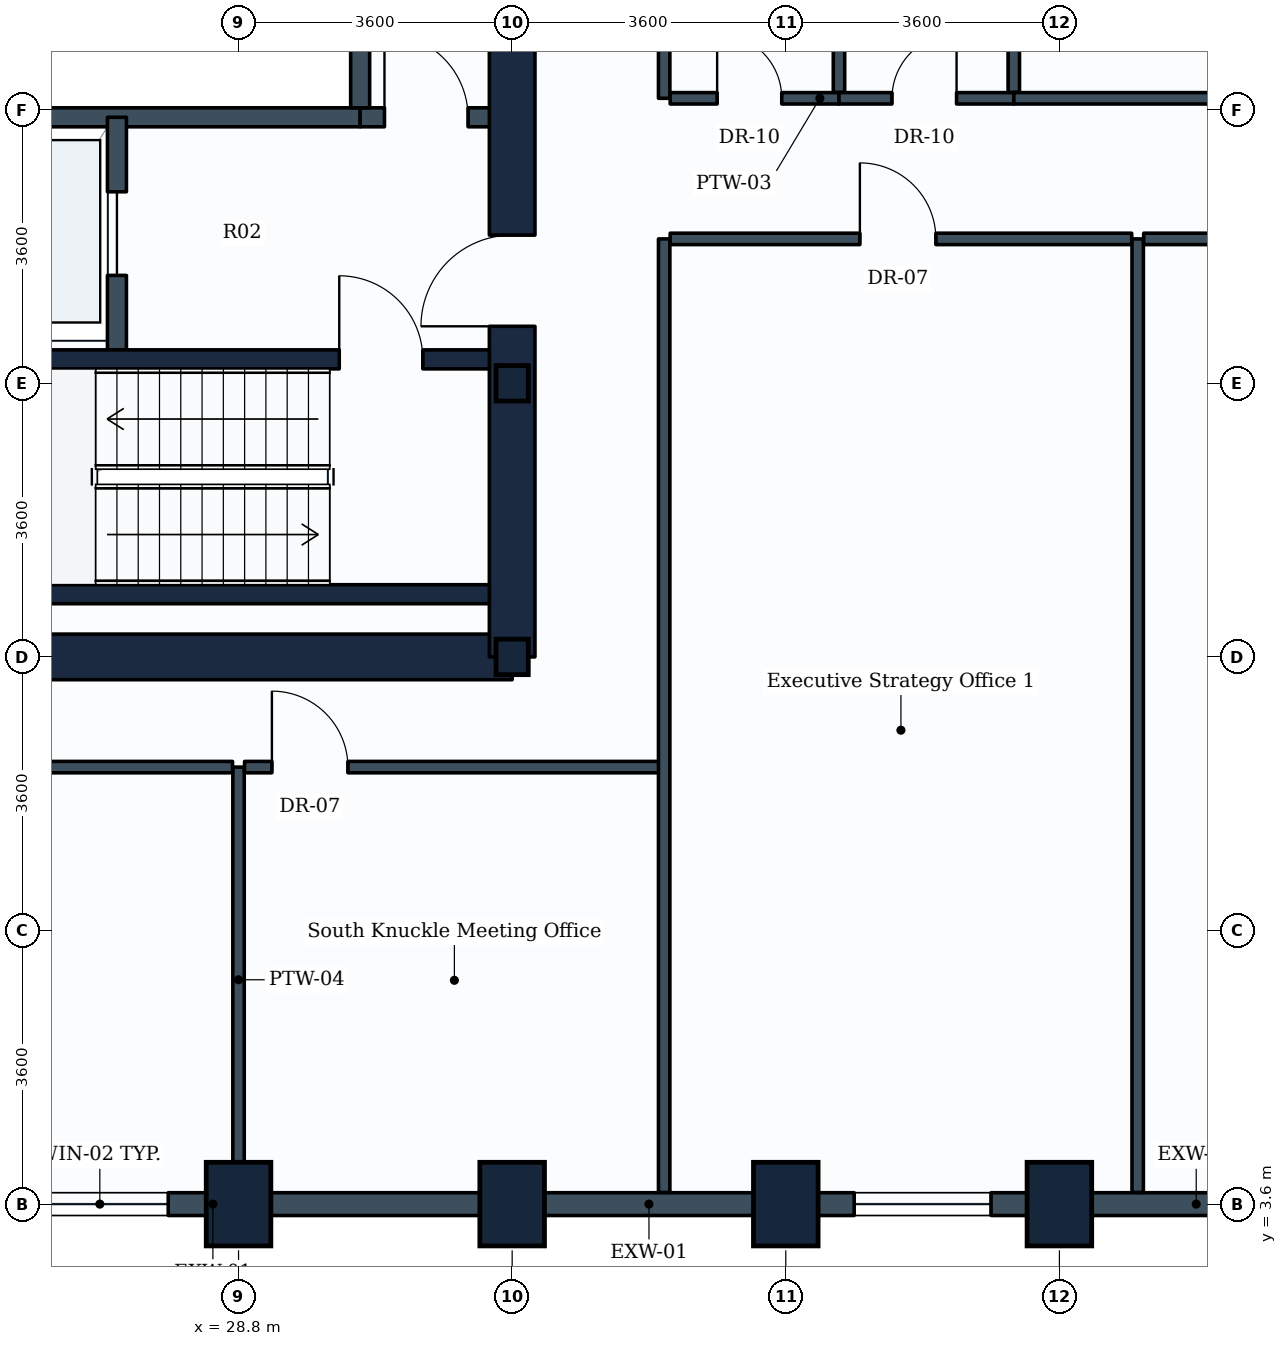
"""IFC4 building model, lengths in metres.
Left out: names, types, materials, properties, quantities, classifications, styles, units other than length and angle.
Written with IfcOpenShell. Run it as: python <this file> out.ifc"""

import sys

from ifc_helpers import new_model, si_unit, direction, frame, frame_2d, origin, origin_2d, place, context, subcontext, project, spatial, rectangle, i_section, extrude, element, fill, save


model = new_model("IFC4")
c1 = context("Model", 3, precision=1e-05, world=origin(), true_north=direction((0.0, 1.0)))
c2 = subcontext(c1, "Body", "Model", "MODEL_VIEW")
j1 = project(units=[si_unit("LENGTHUNIT", "METRE"), si_unit("PLANEANGLEUNIT", "RADIAN")], contexts=[c1])
p1 = place(None, origin())
s1 = spatial("IfcSite", under=j1, at=p1, CompositionType="ELEMENT")
p2 = place(p1, origin())
s2 = spatial("IfcBuilding", under=s1, at=p2, CompositionType="ELEMENT")
p3 = place(p2, frame((0.0, 0.0, 80.1)))
s3 = spatial("IfcBuildingStorey", under=s2, at=p3, CompositionType="ELEMENT", Elevation=80.1)
for number, where, z_axis, x_axis in (
    (1, (28.8, 3.6, 0.0), (0.0, 0.0, 1.0), (1.0, 0.0, 0.0)),
    (2, (32.4, 3.6, 0.0), (0.0, 0.0, 1.0), (1.0, 0.0, 0.0)),
):
    element("IfcColumn", number, at=place(p3, frame(where, z_axis=z_axis, x_axis=x_axis)), inside=s3, PredefinedType="COLUMN", context=c2, shape_type="SweptSolid", body=[
        extrude(rectangle(XDim=0.85, YDim=1.1, at=origin_2d()), origin(), (0.0, 0.0, 1.0), 3.9),
    ])
for number, where, z_axis, x_axis in (
    (3, (32.4, 10.8, 0.0), (0.0, 0.0, 1.0), (1.0, 0.0, 0.0)),
    (4, (32.4, 14.4, 0.0), (0.0, 0.0, 1.0), (1.0, 0.0, 0.0)),
):
    element("IfcColumn", number, at=place(p3, frame(where, z_axis=z_axis, x_axis=x_axis)), inside=s3, PredefinedType="COLUMN", context=c2, shape_type="SweptSolid", body=[
        extrude(i_section(OverallWidth=0.424, OverallDepth=0.467, WebThickness=0.033, FlangeThickness=0.053, FilletRadius=0.015, at=origin_2d()), origin(), (0.0, 0.0, 1.0), 3.9),
    ])
for number, where, z_axis, x_axis in (
    (5, (36.0, 3.6, 0.0), (0.0, 0.0, 1.0), (1.0, 0.0, 0.0)),
    (6, (39.6, 3.6, 0.0), (0.0, 0.0, 1.0), (1.0, 0.0, 0.0)),
):
    element("IfcColumn", number, at=place(p3, frame(where, z_axis=z_axis, x_axis=x_axis)), inside=s3, PredefinedType="COLUMN", context=c2, shape_type="SweptSolid", body=[
        extrude(rectangle(XDim=0.85, YDim=1.1, at=origin_2d()), origin(), (0.0, 0.0, 1.0), 3.9),
    ])
p4 = place(p3, frame((28.8, 3.6, 0.0), z_axis=(0.0, 0.0, 1.0), x_axis=(-1.0, 0.0, 0.0)))
e7 = element("IfcWall", 7, at=p4, inside=s3, PredefinedType="STANDARD", context=c2, shape_type="SweptSolid", body=[
    extrude(rectangle(XDim=3.6, YDim=0.3, at=frame_2d((1.8, 0.0))), origin(), (0.0, 0.0, 1.0), 2.93),
])
p5 = place(p4, frame((0.925, 0.0, 0.85)))
e8 = element("IfcOpeningElement", 8, at=p5, cuts=e7, PredefinedType="OPENING", context=c2, shape_type="SweptSolid", body=[
    extrude(rectangle(XDim=1.8, YDim=1.35, at=frame_2d((0.9, 0.675))), frame((0.0, 0.16, 0.0), z_axis=(0.0, -1.0, 0.0), x_axis=(1.0, 0.0, 0.0)), (0.0, 0.0, 1.0), 0.32),
])
p6 = place(p3, frame((32.4, 3.6, 0.0), z_axis=(0.0, 0.0, 1.0), x_axis=(-1.0, 0.0, 0.0)))
e9 = element("IfcWall", 9, at=p6, inside=s3, PredefinedType="STANDARD", context=c2, shape_type="SweptSolid", body=[
    extrude(rectangle(XDim=3.6, YDim=0.3, at=frame_2d((1.8, 0.0))), origin(), (0.0, 0.0, 1.0), 2.93),
])
p7 = place(p3, frame((36.0, 3.6, 0.0), z_axis=(0.0, 0.0, 1.0), x_axis=(-1.0, 0.0, 0.0)))
e10 = element("IfcWall", 10, at=p7, inside=s3, PredefinedType="STANDARD", context=c2, shape_type="SweptSolid", body=[
    extrude(rectangle(XDim=3.6, YDim=0.3, at=frame_2d((1.8, 0.0))), origin(), (0.0, 0.0, 1.0), 2.93),
])
p8 = place(p3, frame((39.6, 3.6, 0.0), z_axis=(0.0, 0.0, 1.0), x_axis=(-1.0, 0.0, 0.0)))
e11 = element("IfcWall", 11, at=p8, inside=s3, PredefinedType="STANDARD", context=c2, shape_type="SweptSolid", body=[
    extrude(rectangle(XDim=3.6, YDim=0.3, at=frame_2d((1.8, 0.0))), origin(), (0.0, 0.0, 1.0), 2.93),
])
p9 = place(p8, frame((0.9, 0.0, 0.85)))
e12 = element("IfcOpeningElement", 12, at=p9, cuts=e11, PredefinedType="OPENING", context=c2, shape_type="SweptSolid", body=[
    extrude(rectangle(XDim=1.8, YDim=1.35, at=frame_2d((0.9, 0.675))), frame((0.0, 0.16, 0.0), z_axis=(0.0, -1.0, 0.0), x_axis=(1.0, 0.0, 0.0)), (0.0, 0.0, 1.0), 0.32),
])
p10 = place(p3, frame((43.2, 3.6, 0.0), z_axis=(0.0, 0.0, 1.0), x_axis=(-1.0, 0.0, 0.0)))
e13 = element("IfcWall", 13, at=p10, inside=s3, PredefinedType="STANDARD", context=c2, shape_type="SweptSolid", body=[
    extrude(rectangle(XDim=3.6, YDim=0.3, at=frame_2d((1.8, 0.0))), origin(), (0.0, 0.0, 1.0), 2.93),
])
p11 = place(p3, frame((14.4, 10.8, 0.0), z_axis=(0.0, 0.0, 1.0), x_axis=(1.0, 0.0, 0.0)))
e14 = element("IfcWall", 14, at=p11, inside=s3, PredefinedType="SHEAR", context=c2, shape_type="SweptSolid", body=[
    extrude(rectangle(XDim=18.0, YDim=0.6, at=frame_2d((9.0, 0.0))), origin(), (0.0, 0.0, 1.0), 3.65),
])
p12 = place(p3, frame((32.4, 10.8, 0.0), z_axis=(0.0, 0.0, 1.0), x_axis=(0.0, 1.0, 0.0)))
e15 = element("IfcWall", 15, at=p12, inside=s3, PredefinedType="SHEAR", context=c2, shape_type="SweptSolid", body=[
    extrude(rectangle(XDim=14.4, YDim=0.6, at=frame_2d((7.2, 0.0))), origin(), (0.0, 0.0, 1.0), 3.65),
])
p13 = place(p12, frame((4.35, 0.0, 0.0)))
e16 = element("IfcOpeningElement", 16, at=p13, cuts=e15, PredefinedType="OPENING", context=c2, shape_type="SweptSolid", body=[
    extrude(rectangle(XDim=1.2, YDim=2.1, at=frame_2d((0.6, 1.05))), frame((0.0, 0.31, 0.0), z_axis=(0.0, -1.0, 0.0), x_axis=(1.0, 0.0, 0.0)), (0.0, 0.0, 1.0), 0.62),
])
p14 = place(p12, frame((10.0, 0.0, 0.0)))
e17 = element("IfcOpeningElement", 17, at=p14, cuts=e15, PredefinedType="OPENING", context=c2, shape_type="SweptSolid", body=[
    extrude(rectangle(XDim=1.2, YDim=2.1, at=frame_2d((0.6, 1.05))), frame((0.0, 0.31, 0.0), z_axis=(0.0, -1.0, 0.0), x_axis=(1.0, 0.0, 0.0)), (0.0, 0.0, 1.0), 0.62),
])
p15 = place(p3, frame((23.35, 11.625, 0.0), z_axis=(0.0, 0.0, 1.0), x_axis=(1.0, 0.0, 0.0)))
e18 = element("IfcWall", 18, at=p15, inside=s3, PredefinedType="SHEAR", context=c2, shape_type="SweptSolid", body=[
    extrude(rectangle(XDim=8.75, YDim=0.25, at=frame_2d((4.375, 0.0))), origin(), (0.0, 0.0, 1.0), 3.65),
])
p16 = place(p3, frame((23.35, 14.715, 0.0), z_axis=(0.0, 0.0, 1.0), x_axis=(1.0, 0.0, 0.0)))
e19 = element("IfcWall", 19, at=p16, inside=s3, PredefinedType="SHEAR", context=c2, shape_type="SweptSolid", body=[
    extrude(rectangle(XDim=8.75, YDim=0.25, at=frame_2d((4.375, 0.0))), origin(), (0.0, 0.0, 1.0), 3.65),
])
p17 = place(p16, frame((6.775, 0.0, 0.0)))
e20 = element("IfcOpeningElement", 20, at=p17, cuts=e19, PredefinedType="OPENING", context=c2, shape_type="SweptSolid", body=[
    extrude(rectangle(XDim=1.1, YDim=2.1, at=frame_2d((0.55, 1.05))), frame((0.0, 0.135, 0.0), z_axis=(0.0, -1.0, 0.0), x_axis=(1.0, 0.0, 0.0)), (0.0, 0.0, 1.0), 0.27),
])
p18 = place(p3, frame((21.88, 17.9, 0.0), z_axis=(0.0, 0.0, 1.0), x_axis=(1.0, 0.0, 0.0)))
e21 = element("IfcWall", 21, at=p18, inside=s3, PredefinedType="PARTITIONING", context=c2, shape_type="SweptSolid", body=[
    extrude(rectangle(XDim=8.52, YDim=0.25, at=frame_2d((4.26, 0.0))), origin(), (0.0, 0.0, 1.0), 3.635),
])
p19 = place(p3, frame((30.4, 17.9, 0.0), z_axis=(0.0, 0.0, 1.0), x_axis=(1.0, 0.0, 0.0)))
e22 = element("IfcWall", 22, at=p19, inside=s3, PredefinedType="PARTITIONING", context=c2, shape_type="SweptSolid", body=[
    extrude(rectangle(XDim=1.75, YDim=0.25, at=frame_2d((0.875, 0.0))), origin(), (0.0, 0.0, 1.0), 3.635),
])
p20 = place(p19, frame((0.32, 0.0, 0.0)))
e23 = element("IfcOpeningElement", 23, at=p20, cuts=e22, PredefinedType="OPENING", context=c2, shape_type="SweptSolid", body=[
    extrude(rectangle(XDim=1.1, YDim=2.1, at=frame_2d((0.55, 1.05))), frame((0.0, 0.135, 0.0), z_axis=(0.0, -1.0, 0.0), x_axis=(1.0, 0.0, 0.0)), (0.0, 0.0, 1.0), 0.27),
])
p21 = place(p3, frame((27.2, 14.84, 0.0), z_axis=(0.0, 0.0, 1.0), x_axis=(0.0, 1.0, 0.0)))
e24 = element("IfcWall", 24, at=p21, inside=s3, PredefinedType="PARTITIONING", context=c2, shape_type="SweptSolid", body=[
    extrude(rectangle(XDim=3.06, YDim=0.25, at=frame_2d((1.53, 0.0))), origin(), (0.0, 0.0, 1.0), 3.635),
])
p22 = place(p21, frame((0.98, 0.0, 0.0)))
e25 = element("IfcOpeningElement", 25, at=p22, cuts=e24, PredefinedType="OPENING", context=c2, shape_type="SweptSolid", body=[
    extrude(rectangle(XDim=1.1, YDim=2.1, at=frame_2d((0.55, 1.05))), frame((0.0, 0.135, 0.0), z_axis=(0.0, -1.0, 0.0), x_axis=(1.0, 0.0, 0.0)), (0.0, 0.0, 1.0), 0.27),
])
p23 = place(p3, frame((30.4, 18.025, 0.0), z_axis=(0.0, 0.0, 1.0), x_axis=(0.0, 1.0, 0.0)))
e26 = element("IfcWall", 26, at=p23, inside=s3, PredefinedType="PARTITIONING", context=c2, shape_type="SweptSolid", body=[
    extrude(rectangle(XDim=2.27, YDim=0.25, at=frame_2d((1.135, 0.0))), origin(), (0.0, 0.0, 1.0), 3.635),
])
p24 = place(p3, frame((34.4, 18.15, 0.0), z_axis=(0.0, 0.0, 1.0), x_axis=(0.0, 1.0, 0.0)))
e27 = element("IfcWall", 27, at=p24, inside=s3, PredefinedType="PARTITIONING", context=c2, shape_type="SweptSolid", body=[
    extrude(rectangle(XDim=6.896, YDim=0.15, at=frame_2d((3.448, 0.0))), origin(), (0.0, 0.0, 1.0), 2.93),
])
p25 = place(p3, frame((34.479, 18.15, 0.0), z_axis=(0.0, 0.0, 1.0), x_axis=(1.0, 0.0, 0.0)))
e28 = element("IfcWall", 28, at=p25, inside=s3, PredefinedType="PARTITIONING", context=c2, shape_type="SweptSolid", body=[
    extrude(rectangle(XDim=2.221, YDim=0.15, at=frame_2d((1.11, 0.0))), origin(), (0.0, 0.0, 1.0), 3.18),
])
p26 = place(p25, frame((0.618, 0.0, 0.0)))
e29 = element("IfcOpeningElement", 29, at=p26, cuts=e28, PredefinedType="OPENING", context=c2, shape_type="SweptSolid", body=[
    extrude(rectangle(XDim=0.85, YDim=2.1, at=frame_2d((0.425, 1.05))), frame((0.0, 0.085, 0.0), z_axis=(0.0, -1.0, 0.0), x_axis=(1.0, 0.0, 0.0)), (0.0, 0.0, 1.0), 0.17),
])
p27 = place(p3, frame((36.7, 18.229, 0.0), z_axis=(0.0, 0.0, 1.0), x_axis=(0.0, 1.0, 0.0)))
e30 = element("IfcWall", 30, at=p27, inside=s3, PredefinedType="PARTITIONING", context=c2, shape_type="SweptSolid", body=[
    extrude(rectangle(XDim=6.817, YDim=0.15, at=frame_2d((3.408, 0.0))), origin(), (0.0, 0.0, 1.0), 2.93),
])
p28 = place(p3, frame((36.7, 18.15, 0.0), z_axis=(0.0, 0.0, 1.0), x_axis=(1.0, 0.0, 0.0)))
e31 = element("IfcWall", 31, at=p28, inside=s3, PredefinedType="PARTITIONING", context=c2, shape_type="SweptSolid", body=[
    extrude(rectangle(XDim=2.3, YDim=0.15, at=frame_2d((1.15, 0.0))), origin(), (0.0, 0.0, 1.0), 3.27),
])
p29 = place(p28, frame((0.697, 0.0, 0.0)))
e32 = element("IfcOpeningElement", 32, at=p29, cuts=e31, PredefinedType="OPENING", context=c2, shape_type="SweptSolid", body=[
    extrude(rectangle(XDim=0.85, YDim=2.1, at=frame_2d((0.425, 1.05))), frame((0.0, 0.085, 0.0), z_axis=(0.0, -1.0, 0.0), x_axis=(1.0, 0.0, 0.0)), (0.0, 0.0, 1.0), 0.17),
])
p30 = place(p3, frame((39.0, 18.229, 0.0), z_axis=(0.0, 0.0, 1.0), x_axis=(0.0, 1.0, 0.0)))
e33 = element("IfcWall", 33, at=p30, inside=s3, PredefinedType="PARTITIONING", context=c2, shape_type="SweptSolid", body=[
    extrude(rectangle(XDim=3.821, YDim=0.15, at=frame_2d((1.911, 0.0))), origin(), (0.0, 0.0, 1.0), 3.18),
])
p31 = place(p3, frame((28.8, 9.35, 0.0), z_axis=(0.0, 0.0, 1.0), x_axis=(0.0, -1.0, 0.0)))
e34 = element("IfcWall", 34, at=p31, inside=s3, PredefinedType="PARTITIONING", context=c2, shape_type="SweptSolid", body=[
    extrude(rectangle(XDim=5.596, YDim=0.15, at=frame_2d((2.798, 0.0))), origin(), (0.0, 0.0, 1.0), 3.635),
])
p32 = place(p3, frame((12.95, 9.35, 0.0), z_axis=(0.0, 0.0, 1.0), x_axis=(1.0, 0.0, 0.0)))
e35 = element("IfcWall", 35, at=p32, inside=s3, PredefinedType="PARTITIONING", context=c2, shape_type="SweptSolid", body=[
    extrude(rectangle(XDim=15.771, YDim=0.15, at=frame_2d((7.885, 0.0))), origin(), (0.0, 0.0, 1.0), 3.18),
])
p33 = place(p32, frame((4.836, 0.0, 0.0)))
e36 = element("IfcOpeningElement", 36, at=p33, cuts=e35, PredefinedType="OPENING", context=c2, shape_type="SweptSolid", body=[
    extrude(rectangle(XDim=1.0, YDim=2.1, at=frame_2d((0.5, 1.05))), frame((0.0, 0.085, 0.0), z_axis=(0.0, -1.0, 0.0), x_axis=(1.0, 0.0, 0.0)), (0.0, 0.0, 1.0), 0.17),
])
p34 = place(p3, frame((28.879, 9.35, 0.0), z_axis=(0.0, 0.0, 1.0), x_axis=(1.0, 0.0, 0.0)))
e37 = element("IfcWall", 37, at=p34, inside=s3, PredefinedType="PARTITIONING", context=c2, shape_type="SweptSolid", body=[
    extrude(rectangle(XDim=5.521, YDim=0.15, at=frame_2d((2.76, 0.0))), origin(), (0.0, 0.0, 1.0), 3.635),
])
p35 = place(p34, frame((0.36, 0.0, 0.0)))
e38 = element("IfcOpeningElement", 38, at=p35, cuts=e37, PredefinedType="OPENING", context=c2, shape_type="SweptSolid", body=[
    extrude(rectangle(XDim=1.0, YDim=2.1, at=frame_2d((0.5, 1.05))), frame((0.0, 0.085, 0.0), z_axis=(0.0, -1.0, 0.0), x_axis=(1.0, 0.0, 0.0)), (0.0, 0.0, 1.0), 0.17),
])
for number, where, z_axis, x_axis in (
    (39, (34.4, 3.754, 0.0), (0.0, 0.0, 1.0), (0.0, 1.0, 0.0)),
    (40, (40.63, 3.754, 0.0), (0.0, 0.0, 1.0), (0.0, 1.0, 0.0)),
):
    element("IfcWall", number, at=place(p3, frame(where, z_axis=z_axis, x_axis=x_axis)), inside=s3, PredefinedType="PARTITIONING", context=c2, shape_type="SweptSolid", body=[
        extrude(rectangle(XDim=12.546, YDim=0.15, at=frame_2d((6.273, 0.0))), origin(), (0.0, 0.0, 1.0), 2.93),
    ])
p36 = place(p3, frame((34.479, 16.3, 0.0), z_axis=(0.0, 0.0, 1.0), x_axis=(1.0, 0.0, 0.0)))
e41 = element("IfcWall", 41, at=p36, inside=s3, PredefinedType="PARTITIONING", context=c2, shape_type="SweptSolid", body=[
    extrude(rectangle(XDim=6.072, YDim=0.15, at=frame_2d((3.036, 0.0))), origin(), (0.0, 0.0, 1.0), 3.18),
])
p37 = place(p36, frame((2.496, 0.0, 0.0)))
e42 = element("IfcOpeningElement", 42, at=p37, cuts=e41, PredefinedType="OPENING", context=c2, shape_type="SweptSolid", body=[
    extrude(rectangle(XDim=1.0, YDim=2.1, at=frame_2d((0.5, 1.05))), frame((0.0, 0.085, 0.0), z_axis=(0.0, -1.0, 0.0), x_axis=(1.0, 0.0, 0.0)), (0.0, 0.0, 1.0), 0.17),
])
p38 = place(p3, frame((40.709, 16.3, 0.0), z_axis=(0.0, 0.0, 1.0), x_axis=(1.0, 0.0, 0.0)))
e43 = element("IfcWall", 43, at=p38, inside=s3, PredefinedType="PARTITIONING", context=c2, shape_type="SweptSolid", body=[
    extrude(rectangle(XDim=5.712, YDim=0.15, at=frame_2d((2.856, 0.0))), origin(), (0.0, 0.0, 1.0), 3.24),
])
p39 = place(p38, frame((4.351, 0.0, 0.0)))
e44 = element("IfcOpeningElement", 44, at=p39, cuts=e43, PredefinedType="OPENING", context=c2, shape_type="SweptSolid", body=[
    extrude(rectangle(XDim=1.0, YDim=2.1, at=frame_2d((0.5, 1.05))), frame((0.0, 0.085, 0.0), z_axis=(0.0, -1.0, 0.0), x_axis=(1.0, 0.0, 0.0)), (0.0, 0.0, 1.0), 0.17),
])
p40 = place(p3, frame((39.0, 18.15, 0.0), z_axis=(0.0, 0.0, 1.0), x_axis=(1.0, 0.0, 0.0)))
e45 = element("IfcWall", 45, at=p40, inside=s3, PredefinedType="PARTITIONING", context=c2, shape_type="SweptSolid", body=[
    extrude(rectangle(XDim=6.521, YDim=0.15, at=frame_2d((3.26, 0.0))), origin(), (0.0, 0.0, 1.0), 3.18),
])
p41 = place(p40, frame((2.8, 0.0, 0.0)))
e46 = element("IfcOpeningElement", 46, at=p41, cuts=e45, PredefinedType="OPENING", context=c2, shape_type="SweptSolid", body=[
    extrude(rectangle(XDim=1.0, YDim=2.1, at=frame_2d((0.5, 1.05))), frame((0.0, 0.085, 0.0), z_axis=(0.0, -1.0, 0.0), x_axis=(1.0, 0.0, 0.0)), (0.0, 0.0, 1.0), 0.17),
])
p42 = place(p5, origin())
e47 = element("IfcWindow", 47, at=p42, inside=s3, PartitioningType="SINGLE_PANEL", PredefinedType="WINDOW", context=c2, shape_type="SweptSolid", body=[
    extrude(rectangle(XDim=1.8, YDim=1.35, at=frame_2d((0.9, 0.675))), frame((0.0, 0.03, 0.0), z_axis=(0.0, -1.0, 0.0), x_axis=(1.0, 0.0, 0.0)), (0.0, 0.0, 1.0), 0.06),
])
fill(e8, e47)
p43 = place(p9, origin())
e48 = element("IfcWindow", 48, at=p43, inside=s3, PartitioningType="SINGLE_PANEL", PredefinedType="WINDOW", context=c2, shape_type="SweptSolid", body=[
    extrude(rectangle(XDim=1.8, YDim=1.35, at=frame_2d((0.9, 0.675))), frame((0.0, 0.03, 0.0), z_axis=(0.0, -1.0, 0.0), x_axis=(1.0, 0.0, 0.0)), (0.0, 0.0, 1.0), 0.06),
])
fill(e12, e48)
p44 = place(p17, origin())
e49 = element("IfcDoor", 49, at=p44, inside=s3, OperationType="SINGLE_SWING_LEFT", PredefinedType="DOOR", context=c2, shape_type="SweptSolid", body=[
    extrude(rectangle(XDim=1.1, YDim=2.1, at=frame_2d((0.55, 1.05))), frame((0.0, 0.025, 0.0), z_axis=(0.0, -1.0, 0.0), x_axis=(1.0, 0.0, 0.0)), (0.0, 0.0, 1.0), 0.05),
])
fill(e20, e49)
p45 = place(p22, origin())
e50 = element("IfcDoor", 50, at=p45, inside=s3, OperationType="SLIDING_TO_LEFT", PredefinedType="DOOR", context=c2, shape_type="SweptSolid", body=[
    extrude(rectangle(XDim=1.1, YDim=2.1, at=frame_2d((0.55, 1.05))), frame((0.0, 0.025, 0.0), z_axis=(0.0, -1.0, 0.0), x_axis=(1.0, 0.0, 0.0)), (0.0, 0.0, 1.0), 0.05),
])
fill(e25, e50)
p46 = place(p13, origin())
e51 = element("IfcDoor", 51, at=p46, inside=s3, OperationType="SINGLE_SWING_LEFT", PredefinedType="DOOR", context=c2, shape_type="SweptSolid", body=[
    extrude(rectangle(XDim=1.2, YDim=2.1, at=frame_2d((0.6, 1.05))), frame((0.0, 0.025, 0.0), z_axis=(0.0, -1.0, 0.0), x_axis=(1.0, 0.0, 0.0)), (0.0, 0.0, 1.0), 0.05),
])
fill(e16, e51)
p47 = place(p20, origin())
e52 = element("IfcDoor", 52, at=p47, inside=s3, OperationType="SINGLE_SWING_LEFT", PredefinedType="DOOR", context=c2, shape_type="SweptSolid", body=[
    extrude(rectangle(XDim=1.1, YDim=2.1, at=frame_2d((0.55, 1.05))), frame((0.0, 0.025, 0.0), z_axis=(0.0, -1.0, 0.0), x_axis=(1.0, 0.0, 0.0)), (0.0, 0.0, 1.0), 0.05),
])
fill(e23, e52)
p48 = place(p26, origin())
e53 = element("IfcDoor", 53, at=p48, inside=s3, OperationType="SINGLE_SWING_LEFT", PredefinedType="DOOR", context=c2, shape_type="SweptSolid", body=[
    extrude(rectangle(XDim=0.85, YDim=2.1, at=frame_2d((0.425, 1.05))), frame((0.0, 0.025, 0.0), z_axis=(0.0, -1.0, 0.0), x_axis=(1.0, 0.0, 0.0)), (0.0, 0.0, 1.0), 0.05),
])
fill(e29, e53)
p49 = place(p29, origin())
e54 = element("IfcDoor", 54, at=p49, inside=s3, OperationType="SINGLE_SWING_RIGHT", PredefinedType="DOOR", context=c2, shape_type="SweptSolid", body=[
    extrude(rectangle(XDim=0.85, YDim=2.1, at=frame_2d((0.425, 1.05))), frame((0.0, 0.025, 0.0), z_axis=(0.0, -1.0, 0.0), x_axis=(1.0, 0.0, 0.0)), (0.0, 0.0, 1.0), 0.05),
])
fill(e32, e54)
p50 = place(p35, origin())
e55 = element("IfcDoor", 55, at=p50, inside=s3, OperationType="SINGLE_SWING_LEFT", PredefinedType="DOOR", context=c2, shape_type="SweptSolid", body=[
    extrude(rectangle(XDim=1.0, YDim=2.1, at=frame_2d((0.5, 1.05))), frame((0.0, 0.025, 0.0), z_axis=(0.0, -1.0, 0.0), x_axis=(1.0, 0.0, 0.0)), (0.0, 0.0, 1.0), 0.05),
])
fill(e38, e55)
p51 = place(p37, origin())
e56 = element("IfcDoor", 56, at=p51, inside=s3, OperationType="SINGLE_SWING_LEFT", PredefinedType="DOOR", context=c2, shape_type="SweptSolid", body=[
    extrude(rectangle(XDim=1.0, YDim=2.1, at=frame_2d((0.5, 1.05))), frame((0.0, 0.025, 0.0), z_axis=(0.0, -1.0, 0.0), x_axis=(1.0, 0.0, 0.0)), (0.0, 0.0, 1.0), 0.05),
])
fill(e42, e56)
save(model, sys.argv[1])
